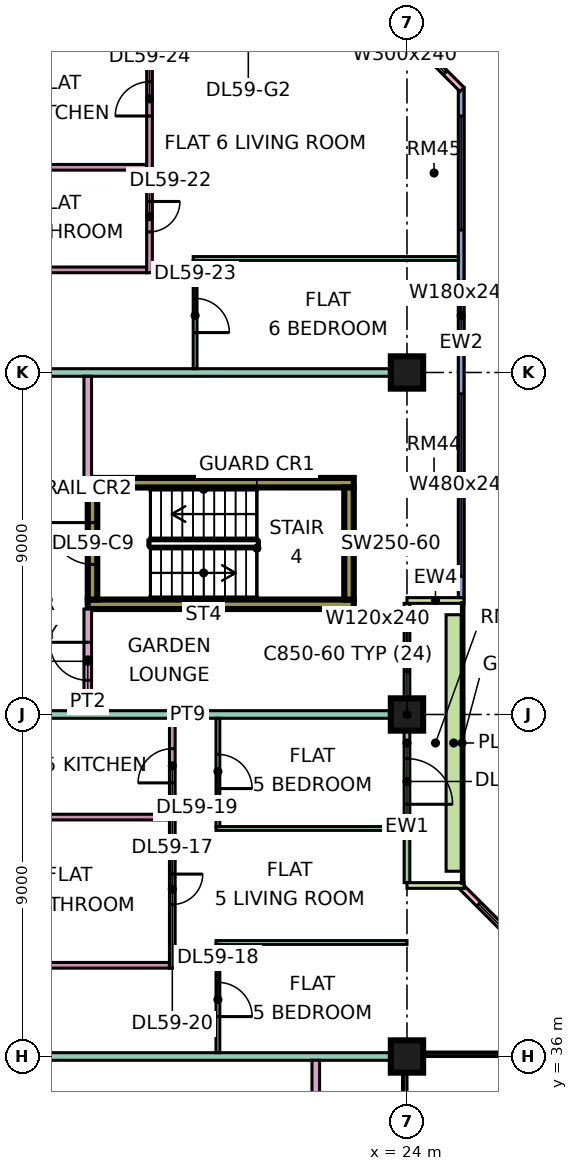
"""IFC4 building model, lengths in metres.
Left out: names, types, materials, properties, quantities, classifications, styles, units other than length and angle.
Written with IfcOpenShell. Run it as: python <this file> out.ifc"""

import sys

from ifc_helpers import new_model, si_unit, direction, frame, frame_2d, origin, origin_2d, place, context, subcontext, project, spatial, rectangle, extrude, element, fill, save


model = new_model("IFC4")
c1 = context("Model", 3, precision=1e-05, world=origin(), true_north=direction((0.0, 1.0)))
c2 = subcontext(c1, "Body", "Model", "MODEL_VIEW")
j1 = project(units=[si_unit("LENGTHUNIT", "METRE"), si_unit("PLANEANGLEUNIT", "RADIAN")], contexts=[c1])
p1 = place(None, origin())
s1 = spatial("IfcSite", under=j1, at=p1, CompositionType="ELEMENT")
p2 = place(p1, origin())
s2 = spatial("IfcBuilding", under=s1, at=p2, CompositionType="ELEMENT")
p3 = place(p2, frame((0.0, 0.0, 249.15)))
s3 = spatial("IfcBuildingStorey", under=s2, at=p3, CompositionType="ELEMENT", Elevation=249.15)
for number, where, z_axis, x_axis in (
    (1, (24.0, 36.0, 0.0), (0.0, 0.0, 1.0), (1.0, 0.0, 0.0)),
    (2, (24.0, 45.0, 0.0), (0.0, 0.0, 1.0), (1.0, 0.0, 0.0)),
    (3, (24.0, 54.0, 0.0), (0.0, 0.0, 1.0), (1.0, 0.0, 0.0)),
):
    element("IfcColumn", number, at=place(p3, frame(where, z_axis=z_axis, x_axis=x_axis)), inside=s3, PredefinedType="COLUMN", context=c2, shape_type="SweptSolid", body=[
        extrude(rectangle(XDim=0.85, YDim=0.85, at=origin_2d()), origin(), (0.0, 0.0, 1.0), 3.75),
    ])
for number, where, z_axis, x_axis in (
    (4, (15.6, 47.9, 0.0), (0.0, 0.0, 1.0), (1.0, 0.0, 0.0)),
    (5, (15.6, 51.1, 0.0), (0.0, 0.0, 1.0), (1.0, 0.0, 0.0)),
):
    element("IfcWall", number, at=place(p3, frame(where, z_axis=z_axis, x_axis=x_axis)), inside=s3, PredefinedType="SHEAR", context=c2, shape_type="SweptSolid", body=[
        extrude(rectangle(XDim=7.0, YDim=0.25, at=frame_2d((3.5, 0.0))), origin(), (0.0, 0.0, 1.0), 3.75),
    ])
p4 = place(p3, frame((15.725, 48.025, 0.0), z_axis=(0.0, 0.0, 1.0), x_axis=(0.0, 1.0, 0.0)))
e6 = element("IfcWall", 6, at=p4, inside=s3, PredefinedType="SHEAR", context=c2, shape_type="SweptSolid", body=[
    extrude(rectangle(XDim=2.95, YDim=0.25, at=frame_2d((1.475, 0.0))), origin(), (0.0, 0.0, 1.0), 3.75),
])
p5 = place(p4, frame((0.925, 0.0, 0.0)))
e7 = element("IfcOpeningElement", 7, at=p5, cuts=e6, PredefinedType="OPENING", context=c2, shape_type="SweptSolid", body=[
    extrude(rectangle(XDim=1.1, YDim=2.2, at=frame_2d((0.55, 1.1))), frame((0.0, 0.135, 0.0), z_axis=(0.0, -1.0, 0.0), x_axis=(1.0, 0.0, 0.0)), (0.0, 0.0, 1.0), 0.27),
])
p6 = place(p3, frame((22.475, 48.025, 0.0), z_axis=(0.0, 0.0, 1.0), x_axis=(0.0, 1.0, 0.0)))
e8 = element("IfcWall", 8, at=p6, inside=s3, PredefinedType="SHEAR", context=c2, shape_type="SweptSolid", body=[
    extrude(rectangle(XDim=2.95, YDim=0.25, at=frame_2d((1.475, 0.0))), origin(), (0.0, 0.0, 1.0), 3.75),
])
p7 = place(p3, frame((28.447, 37.447, 0.0), z_axis=(0.0, 0.0, 1.0), x_axis=(-0.707106781187, 0.707106781187, 0.0)))
e9 = element("IfcWall", 9, at=p7, inside=s3, PredefinedType="SOLIDWALL", context=c2, shape_type="SweptSolid", body=[
    extrude(rectangle(XDim=4.243, YDim=0.15, at=frame_2d((2.121, 0.0))), origin(), (0.0, 0.0, 1.0), 3.35),
])
p8 = place(p7, frame((0.621, 0.0, 0.45)))
e10 = element("IfcOpeningElement", 10, at=p8, cuts=e9, PredefinedType="OPENING", context=c2, shape_type="SweptSolid", body=[
    extrude(rectangle(XDim=3.0, YDim=2.4, at=frame_2d((1.5, 1.2))), frame((0.0, 0.085, 0.0), z_axis=(0.0, -1.0, 0.0), x_axis=(1.0, 0.0, 0.0)), (0.0, 0.0, 1.0), 0.17),
])
p9 = place(p3, frame((24.0, 40.575, 0.0), z_axis=(0.0, 0.0, 1.0), x_axis=(0.0, 1.0, 0.0)))
e11 = element("IfcWall", 11, at=p9, inside=s3, PredefinedType="SOLIDWALL", context=c2, shape_type="SweptSolid", body=[
    extrude(rectangle(XDim=7.35, YDim=0.15, at=frame_2d((3.675, 0.0))), origin(), (0.0, 0.0, 1.0), 3.35),
])
p10 = place(p9, frame((2.062, 0.0, 0.0)))
e12 = element("IfcOpeningElement", 12, at=p10, cuts=e11, PredefinedType="OPENING", context=c2, shape_type="SweptSolid", body=[
    extrude(rectangle(XDim=1.2, YDim=2.4, at=frame_2d((0.6, 1.2))), frame((0.0, 0.085, 0.0), z_axis=(0.0, -1.0, 0.0), x_axis=(1.0, 0.0, 0.0)), (0.0, 0.0, 1.0), 0.17),
])
p11 = place(p9, frame((5.55, 0.0, 0.45)))
e13 = element("IfcOpeningElement", 13, at=p11, cuts=e11, PredefinedType="OPENING", context=c2, shape_type="SweptSolid", body=[
    extrude(rectangle(XDim=1.2, YDim=2.4, at=frame_2d((0.6, 1.2))), frame((0.0, 0.085, 0.0), z_axis=(0.0, -1.0, 0.0), x_axis=(1.0, 0.0, 0.0)), (0.0, 0.0, 1.0), 0.17),
])
for number, where, z_axis, x_axis in (
    (14, (25.5, 40.5, 0.0), (0.0, 0.0, 1.0), (-1.0, 0.0, 0.0)),
    (15, (25.5, 48.0, 0.0), (0.0, 0.0, 1.0), (-1.0, 0.0, 0.0)),
):
    element("IfcWall", number, at=place(p3, frame(where, z_axis=z_axis, x_axis=x_axis)), inside=s3, PredefinedType="SOLIDWALL", context=c2, shape_type="SweptSolid", body=[
        extrude(rectangle(XDim=1.5, YDim=0.15, at=frame_2d((0.75, 0.0))), origin(), (0.0, 0.0, 1.0), 3.35),
    ])
p12 = place(p3, frame((25.425, 48.075, 0.0), z_axis=(0.0, 0.0, 1.0), x_axis=(0.0, 1.0, 0.0)))
e16 = element("IfcWall", 16, at=p12, inside=s3, PredefinedType="SOLIDWALL", context=c2, shape_type="SweptSolid", body=[
    extrude(rectangle(XDim=13.425, YDim=0.15, at=frame_2d((6.712, 0.0))), origin(), (0.0, 0.0, 1.0), 3.35),
])
p13 = place(p12, frame((0.562, 0.0, 0.45)))
e17 = element("IfcOpeningElement", 17, at=p13, cuts=e16, PredefinedType="OPENING", context=c2, shape_type="SweptSolid", body=[
    extrude(rectangle(XDim=4.8, YDim=2.4, at=frame_2d((2.4, 1.2))), frame((0.0, 0.085, 0.0), z_axis=(0.0, -1.0, 0.0), x_axis=(1.0, 0.0, 0.0)), (0.0, 0.0, 1.0), 0.17),
])
p14 = place(p12, frame((6.525, 0.0, 0.45)))
e18 = element("IfcOpeningElement", 18, at=p14, cuts=e16, PredefinedType="OPENING", context=c2, shape_type="SweptSolid", body=[
    extrude(rectangle(XDim=1.8, YDim=2.4, at=frame_2d((0.9, 1.2))), frame((0.0, 0.085, 0.0), z_axis=(0.0, -1.0, 0.0), x_axis=(1.0, 0.0, 0.0)), (0.0, 0.0, 1.0), 0.17),
])
p15 = place(p12, frame((9.675, 0.0, 0.45)))
e19 = element("IfcOpeningElement", 19, at=p15, cuts=e16, PredefinedType="OPENING", context=c2, shape_type="SweptSolid", body=[
    extrude(rectangle(XDim=3.0, YDim=2.4, at=frame_2d((1.5, 1.2))), frame((0.0, 0.085, 0.0), z_axis=(0.0, -1.0, 0.0), x_axis=(1.0, 0.0, 0.0)), (0.0, 0.0, 1.0), 0.17),
])
p16 = place(p3, frame((25.447, 61.447, 0.0), z_axis=(0.0, 0.0, 1.0), x_axis=(-0.707106781187, 0.707106781187, 0.0)))
e20 = element("IfcWall", 20, at=p16, inside=s3, PredefinedType="SOLIDWALL", context=c2, shape_type="SweptSolid", body=[
    extrude(rectangle(XDim=4.243, YDim=0.15, at=frame_2d((2.121, 0.0))), origin(), (0.0, 0.0, 1.0), 3.35),
])
p17 = place(p16, frame((0.621, 0.0, 0.45)))
e21 = element("IfcOpeningElement", 21, at=p17, cuts=e20, PredefinedType="OPENING", context=c2, shape_type="SweptSolid", body=[
    extrude(rectangle(XDim=3.0, YDim=2.4, at=frame_2d((1.5, 1.2))), frame((0.0, 0.085, 0.0), z_axis=(0.0, -1.0, 0.0), x_axis=(1.0, 0.0, 0.0)), (0.0, 0.0, 1.0), 0.17),
])
p18 = place(p3, frame((25.229, 40.875, 0.0), z_axis=(0.0, 0.0, 1.0), x_axis=(0.0, 1.0, 0.0)))
e22 = element("IfcWall", 22, at=p18, inside=s3, PredefinedType="SOLIDWALL", context=c2, shape_type="SweptSolid", body=[
    extrude(rectangle(XDim=6.75, YDim=0.4, at=frame_2d((3.375, 0.0))), origin(), (0.0, 0.0, 1.0), 0.7),
])
p19 = place(p3, frame((12.525, 36.0, 0.0), z_axis=(0.0, 0.0, 1.0), x_axis=(1.0, 0.0, 0.0)))
e23 = element("IfcWall", 23, at=p19, inside=s3, PredefinedType="PARTITIONING", context=c2, shape_type="SweptSolid", body=[
    extrude(rectangle(XDim=11.475, YDim=0.2, at=frame_2d((5.738, 0.0))), origin(), (0.0, 0.0, 1.0), 3.35),
])
for number, where, z_axis, x_axis in (
    (24, (12.525, 38.4, 0.0), (0.0, 0.0, 1.0), (1.0, 0.0, 0.0)),
    (25, (12.525, 42.3, 0.0), (0.0, 0.0, 1.0), (1.0, 0.0, 0.0)),
):
    element("IfcWall", number, at=place(p3, frame(where, z_axis=z_axis, x_axis=x_axis)), inside=s3, PredefinedType="PARTITIONING", context=c2, shape_type="SweptSolid", body=[
        extrude(rectangle(XDim=5.225, YDim=0.15, at=frame_2d((2.613, 0.0))), origin(), (0.0, 0.0, 1.0), 3.35),
    ])
p20 = place(p3, frame((12.525, 45.0, 0.0), z_axis=(0.0, 0.0, 1.0), x_axis=(1.0, 0.0, 0.0)))
e26 = element("IfcWall", 26, at=p20, inside=s3, PredefinedType="PARTITIONING", context=c2, shape_type="SweptSolid", body=[
    extrude(rectangle(XDim=11.401, YDim=0.2, at=frame_2d((5.701, 0.0))), origin(), (0.0, 0.0, 1.0), 3.35),
])
p21 = place(p3, frame((12.525, 54.0, 0.0), z_axis=(0.0, 0.0, 1.0), x_axis=(1.0, 0.0, 0.0)))
e27 = element("IfcWall", 27, at=p21, inside=s3, PredefinedType="PARTITIONING", context=c2, shape_type="SweptSolid", body=[
    extrude(rectangle(XDim=11.475, YDim=0.2, at=frame_2d((5.738, 0.0))), origin(), (0.0, 0.0, 1.0), 3.35),
])
for number, where, z_axis, x_axis in (
    (28, (12.525, 56.7, 0.0), (0.0, 0.0, 1.0), (1.0, 0.0, 0.0)),
    (29, (12.525, 59.4, 0.0), (0.0, 0.0, 1.0), (1.0, 0.0, 0.0)),
):
    element("IfcWall", number, at=place(p3, frame(where, z_axis=z_axis, x_axis=x_axis)), inside=s3, PredefinedType="PARTITIONING", context=c2, shape_type="SweptSolid", body=[
        extrude(rectangle(XDim=4.625, YDim=0.15, at=frame_2d((2.312, 0.0))), origin(), (0.0, 0.0, 1.0), 3.35),
    ])
p22 = place(p3, frame((15.6, 45.1, 0.0), z_axis=(0.0, 0.0, 1.0), x_axis=(0.0, 1.0, 0.0)))
e30 = element("IfcWall", 30, at=p22, inside=s3, PredefinedType="PARTITIONING", context=c2, shape_type="SweptSolid", body=[
    extrude(rectangle(XDim=2.675, YDim=0.2, at=frame_2d((1.337, 0.0))), origin(), (0.0, 0.0, 1.0), 3.35),
])
p23 = place(p22, frame((0.8, 0.0, 0.0)))
e31 = element("IfcOpeningElement", 31, at=p23, cuts=e30, PredefinedType="OPENING", context=c2, shape_type="SweptSolid", body=[
    extrude(rectangle(XDim=1.0, YDim=2.1, at=frame_2d((0.5, 1.05))), frame((0.0, 0.11, 0.0), z_axis=(0.0, -1.0, 0.0), x_axis=(1.0, 0.0, 0.0)), (0.0, 0.0, 1.0), 0.22),
])
p24 = place(p3, frame((15.6, 51.225, 0.0), z_axis=(0.0, 0.0, 1.0), x_axis=(0.0, 1.0, 0.0)))
e32 = element("IfcWall", 32, at=p24, inside=s3, PredefinedType="PARTITIONING", context=c2, shape_type="SweptSolid", body=[
    extrude(rectangle(XDim=2.675, YDim=0.2, at=frame_2d((1.337, 0.0))), origin(), (0.0, 0.0, 1.0), 3.35),
])
p25 = place(p3, frame((17.225, 56.625, 0.0), z_axis=(0.0, 0.0, 1.0), x_axis=(0.0, 1.0, 0.0)))
e33 = element("IfcWall", 33, at=p25, inside=s3, PredefinedType="PARTITIONING", context=c2, shape_type="SweptSolid", body=[
    extrude(rectangle(XDim=6.301, YDim=0.15, at=frame_2d((3.15, 0.0))), origin(), (0.0, 0.0, 1.0), 3.35),
])
p26 = place(p25, frame((1.075, 0.0, 0.0)))
e34 = element("IfcOpeningElement", 34, at=p26, cuts=e33, PredefinedType="OPENING", context=c2, shape_type="SweptSolid", body=[
    extrude(rectangle(XDim=0.8, YDim=2.1, at=frame_2d((0.4, 1.05))), frame((0.0, 0.085, 0.0), z_axis=(0.0, -1.0, 0.0), x_axis=(1.0, 0.0, 0.0)), (0.0, 0.0, 1.0), 0.17),
])
p27 = place(p25, frame((4.125, 0.0, 0.0)))
e35 = element("IfcOpeningElement", 35, at=p27, cuts=e33, PredefinedType="OPENING", context=c2, shape_type="SweptSolid", body=[
    extrude(rectangle(XDim=0.9, YDim=2.1, at=frame_2d((0.45, 1.05))), frame((0.0, 0.085, 0.0), z_axis=(0.0, -1.0, 0.0), x_axis=(1.0, 0.0, 0.0)), (0.0, 0.0, 1.0), 0.17),
])
p28 = place(p3, frame((17.825, 38.325, 0.0), z_axis=(0.0, 0.0, 1.0), x_axis=(0.0, 1.0, 0.0)))
e36 = element("IfcWall", 36, at=p28, inside=s3, PredefinedType="PARTITIONING", context=c2, shape_type="SweptSolid", body=[
    extrude(rectangle(XDim=6.575, YDim=0.15, at=frame_2d((3.288, 0.0))), origin(), (0.0, 0.0, 1.0), 3.35),
])
p29 = place(p28, frame((1.675, 0.0, 0.0)))
e37 = element("IfcOpeningElement", 37, at=p29, cuts=e36, PredefinedType="OPENING", context=c2, shape_type="SweptSolid", body=[
    extrude(rectangle(XDim=0.8, YDim=2.1, at=frame_2d((0.4, 1.05))), frame((0.0, 0.085, 0.0), z_axis=(0.0, -1.0, 0.0), x_axis=(1.0, 0.0, 0.0)), (0.0, 0.0, 1.0), 0.17),
])
p30 = place(p28, frame((4.875, 0.0, 0.0)))
e38 = element("IfcOpeningElement", 38, at=p30, cuts=e36, PredefinedType="OPENING", context=c2, shape_type="SweptSolid", body=[
    extrude(rectangle(XDim=0.9, YDim=2.1, at=frame_2d((0.45, 1.05))), frame((0.0, 0.085, 0.0), z_axis=(0.0, -1.0, 0.0), x_axis=(1.0, 0.0, 0.0)), (0.0, 0.0, 1.0), 0.17),
])
p31 = place(p3, frame((18.375, 57.0, 0.0), z_axis=(0.0, 0.0, 1.0), x_axis=(1.0, 0.0, 0.0)))
e39 = element("IfcWall", 39, at=p31, inside=s3, PredefinedType="PARTITIONING", context=c2, shape_type="SweptSolid", body=[
    extrude(rectangle(XDim=6.975, YDim=0.1, at=frame_2d((3.488, 0.0))), origin(), (0.0, 0.0, 1.0), 3.35),
])
p32 = place(p3, frame((18.425, 54.1, 0.0), z_axis=(0.0, 0.0, 1.0), x_axis=(0.0, 1.0, 0.0)))
e40 = element("IfcWall", 40, at=p32, inside=s3, PredefinedType="PARTITIONING", context=c2, shape_type="SweptSolid", body=[
    extrude(rectangle(XDim=2.85, YDim=0.1, at=frame_2d((1.425, 0.0))), origin(), (0.0, 0.0, 1.0), 3.35),
])
p33 = place(p32, frame((0.95, 0.0, 0.0)))
e41 = element("IfcOpeningElement", 41, at=p33, cuts=e40, PredefinedType="OPENING", context=c2, shape_type="SweptSolid", body=[
    extrude(rectangle(XDim=0.9, YDim=2.1, at=frame_2d((0.45, 1.05))), frame((0.0, 0.06, 0.0), z_axis=(0.0, -1.0, 0.0), x_axis=(1.0, 0.0, 0.0)), (0.0, 0.0, 1.0), 0.12),
])
p34 = place(p3, frame((18.975, 39.0, 0.0), z_axis=(0.0, 0.0, 1.0), x_axis=(1.0, 0.0, 0.0)))
e42 = element("IfcWall", 42, at=p34, inside=s3, PredefinedType="PARTITIONING", context=c2, shape_type="SweptSolid", body=[
    extrude(rectangle(XDim=5.025, YDim=0.1, at=frame_2d((2.512, 0.0))), origin(), (0.0, 0.0, 1.0), 3.35),
])
p35 = place(p3, frame((18.975, 42.0, 0.0), z_axis=(0.0, 0.0, 1.0), x_axis=(1.0, 0.0, 0.0)))
e43 = element("IfcWall", 43, at=p35, inside=s3, PredefinedType="PARTITIONING", context=c2, shape_type="SweptSolid", body=[
    extrude(rectangle(XDim=4.951, YDim=0.1, at=frame_2d((2.476, 0.0))), origin(), (0.0, 0.0, 1.0), 3.35),
])
p36 = place(p3, frame((19.025, 36.1, 0.0), z_axis=(0.0, 0.0, 1.0), x_axis=(0.0, 1.0, 0.0)))
e44 = element("IfcWall", 44, at=p36, inside=s3, PredefinedType="PARTITIONING", context=c2, shape_type="SweptSolid", body=[
    extrude(rectangle(XDim=2.85, YDim=0.1, at=frame_2d((1.425, 0.0))), origin(), (0.0, 0.0, 1.0), 3.35),
])
p37 = place(p36, frame((0.95, 0.0, 0.0)))
e45 = element("IfcOpeningElement", 45, at=p37, cuts=e44, PredefinedType="OPENING", context=c2, shape_type="SweptSolid", body=[
    extrude(rectangle(XDim=0.9, YDim=2.1, at=frame_2d((0.45, 1.05))), frame((0.0, 0.06, 0.0), z_axis=(0.0, -1.0, 0.0), x_axis=(1.0, 0.0, 0.0)), (0.0, 0.0, 1.0), 0.12),
])
p38 = place(p3, frame((19.025, 42.05, 0.0), z_axis=(0.0, 0.0, 1.0), x_axis=(0.0, 1.0, 0.0)))
e46 = element("IfcWall", 46, at=p38, inside=s3, PredefinedType="PARTITIONING", context=c2, shape_type="SweptSolid", body=[
    extrude(rectangle(XDim=2.85, YDim=0.1, at=frame_2d((1.425, 0.0))), origin(), (0.0, 0.0, 1.0), 3.35),
])
p39 = place(p38, frame((1.0, 0.0, 0.0)))
e47 = element("IfcOpeningElement", 47, at=p39, cuts=e46, PredefinedType="OPENING", context=c2, shape_type="SweptSolid", body=[
    extrude(rectangle(XDim=0.9, YDim=2.1, at=frame_2d((0.45, 1.05))), frame((0.0, 0.06, 0.0), z_axis=(0.0, -1.0, 0.0), x_axis=(1.0, 0.0, 0.0)), (0.0, 0.0, 1.0), 0.12),
])
p40 = place(p3, frame((21.6, 23.9, 0.0), z_axis=(0.0, 0.0, 1.0), x_axis=(0.0, 1.0, 0.0)))
e48 = element("IfcWall", 48, at=p40, inside=s3, PredefinedType="PARTITIONING", context=c2, shape_type="SweptSolid", body=[
    extrude(rectangle(XDim=12.0, YDim=0.2, at=frame_2d((6.0, 0.0))), origin(), (0.0, 0.0, 1.0), 3.35),
])
p41 = place(p8, origin())
e49 = element("IfcWindow", 49, at=p41, inside=s3, PartitioningType="SINGLE_PANEL", PredefinedType="WINDOW", context=c2, shape_type="SweptSolid", body=[
    extrude(rectangle(XDim=3.0, YDim=2.4, at=frame_2d((1.5, 1.2))), frame((0.0, 0.03, 0.0), z_axis=(0.0, -1.0, 0.0), x_axis=(1.0, 0.0, 0.0)), (0.0, 0.0, 1.0), 0.06),
])
fill(e10, e49)
p42 = place(p10, frame((1.2, 0.0, 0.0), z_axis=(0.0, 0.0, 1.0), x_axis=(-1.0, 0.0, 0.0)))
e50 = element("IfcDoor", 50, at=p42, inside=s3, OperationType="DOUBLE_DOOR_SINGLE_SWING", PredefinedType="DOOR", context=c2, shape_type="SweptSolid", body=[
    extrude(rectangle(XDim=1.2, YDim=2.4, at=frame_2d((0.6, 1.2))), frame((0.0, 0.025, 0.0), z_axis=(0.0, -1.0, 0.0), x_axis=(1.0, 0.0, 0.0)), (0.0, 0.0, 1.0), 0.05),
])
fill(e12, e50)
p43 = place(p11, origin())
e51 = element("IfcWindow", 51, at=p43, inside=s3, PartitioningType="SINGLE_PANEL", PredefinedType="WINDOW", context=c2, shape_type="SweptSolid", body=[
    extrude(rectangle(XDim=1.2, YDim=2.4, at=frame_2d((0.6, 1.2))), frame((0.0, 0.03, 0.0), z_axis=(0.0, -1.0, 0.0), x_axis=(1.0, 0.0, 0.0)), (0.0, 0.0, 1.0), 0.06),
])
fill(e13, e51)
p44 = place(p13, origin())
e52 = element("IfcWindow", 52, at=p44, inside=s3, PartitioningType="SINGLE_PANEL", PredefinedType="WINDOW", context=c2, shape_type="SweptSolid", body=[
    extrude(rectangle(XDim=4.8, YDim=2.4, at=frame_2d((2.4, 1.2))), frame((0.0, 0.03, 0.0), z_axis=(0.0, -1.0, 0.0), x_axis=(1.0, 0.0, 0.0)), (0.0, 0.0, 1.0), 0.06),
])
fill(e17, e52)
p45 = place(p14, origin())
e53 = element("IfcWindow", 53, at=p45, inside=s3, PartitioningType="SINGLE_PANEL", PredefinedType="WINDOW", context=c2, shape_type="SweptSolid", body=[
    extrude(rectangle(XDim=1.8, YDim=2.4, at=frame_2d((0.9, 1.2))), frame((0.0, 0.03, 0.0), z_axis=(0.0, -1.0, 0.0), x_axis=(1.0, 0.0, 0.0)), (0.0, 0.0, 1.0), 0.06),
])
fill(e18, e53)
p46 = place(p15, origin())
e54 = element("IfcWindow", 54, at=p46, inside=s3, PartitioningType="SINGLE_PANEL", PredefinedType="WINDOW", context=c2, shape_type="SweptSolid", body=[
    extrude(rectangle(XDim=3.0, YDim=2.4, at=frame_2d((1.5, 1.2))), frame((0.0, 0.03, 0.0), z_axis=(0.0, -1.0, 0.0), x_axis=(1.0, 0.0, 0.0)), (0.0, 0.0, 1.0), 0.06),
])
fill(e19, e54)
p47 = place(p17, origin())
e55 = element("IfcWindow", 55, at=p47, inside=s3, PartitioningType="SINGLE_PANEL", PredefinedType="WINDOW", context=c2, shape_type="SweptSolid", body=[
    extrude(rectangle(XDim=3.0, YDim=2.4, at=frame_2d((1.5, 1.2))), frame((0.0, 0.03, 0.0), z_axis=(0.0, -1.0, 0.0), x_axis=(1.0, 0.0, 0.0)), (0.0, 0.0, 1.0), 0.06),
])
fill(e21, e55)
p48 = place(p5, frame((1.1, 0.0, 0.0), z_axis=(0.0, 0.0, 1.0), x_axis=(-1.0, 0.0, 0.0)))
e56 = element("IfcDoor", 56, at=p48, inside=s3, OperationType="SINGLE_SWING_RIGHT", PredefinedType="DOOR", context=c2, shape_type="SweptSolid", body=[
    extrude(rectangle(XDim=1.1, YDim=2.2, at=frame_2d((0.55, 1.1))), frame((0.0, 0.025, 0.0), z_axis=(0.0, -1.0, 0.0), x_axis=(1.0, 0.0, 0.0)), (0.0, 0.0, 1.0), 0.05),
])
fill(e7, e56)
p49 = place(p29, origin())
e57 = element("IfcDoor", 57, at=p49, inside=s3, OperationType="SINGLE_SWING_RIGHT", PredefinedType="DOOR", context=c2, shape_type="SweptSolid", body=[
    extrude(rectangle(XDim=0.8, YDim=2.1, at=frame_2d((0.4, 1.05))), frame((0.0, 0.025, 0.0), z_axis=(0.0, -1.0, 0.0), x_axis=(1.0, 0.0, 0.0)), (0.0, 0.0, 1.0), 0.05),
])
fill(e37, e57)
p50 = place(p37, frame((0.9, 0.0, 0.0), z_axis=(0.0, 0.0, 1.0), x_axis=(-1.0, 0.0, 0.0)))
e58 = element("IfcDoor", 58, at=p50, inside=s3, OperationType="SINGLE_SWING_LEFT", PredefinedType="DOOR", context=c2, shape_type="SweptSolid", body=[
    extrude(rectangle(XDim=0.9, YDim=2.1, at=frame_2d((0.45, 1.05))), frame((0.0, 0.025, 0.0), z_axis=(0.0, -1.0, 0.0), x_axis=(1.0, 0.0, 0.0)), (0.0, 0.0, 1.0), 0.05),
])
fill(e45, e58)
p51 = place(p39, frame((0.9, 0.0, 0.0), z_axis=(0.0, 0.0, 1.0), x_axis=(-1.0, 0.0, 0.0)))
e59 = element("IfcDoor", 59, at=p51, inside=s3, OperationType="SINGLE_SWING_LEFT", PredefinedType="DOOR", context=c2, shape_type="SweptSolid", body=[
    extrude(rectangle(XDim=0.9, YDim=2.1, at=frame_2d((0.45, 1.05))), frame((0.0, 0.025, 0.0), z_axis=(0.0, -1.0, 0.0), x_axis=(1.0, 0.0, 0.0)), (0.0, 0.0, 1.0), 0.05),
])
fill(e47, e59)
p52 = place(p30, origin())
e60 = element("IfcDoor", 60, at=p52, inside=s3, OperationType="SINGLE_SWING_LEFT", PredefinedType="DOOR", context=c2, shape_type="SweptSolid", body=[
    extrude(rectangle(XDim=0.9, YDim=2.1, at=frame_2d((0.45, 1.05))), frame((0.0, 0.025, 0.0), z_axis=(0.0, -1.0, 0.0), x_axis=(1.0, 0.0, 0.0)), (0.0, 0.0, 1.0), 0.05),
])
fill(e38, e60)
p53 = place(p26, origin())
e61 = element("IfcDoor", 61, at=p53, inside=s3, OperationType="SINGLE_SWING_RIGHT", PredefinedType="DOOR", context=c2, shape_type="SweptSolid", body=[
    extrude(rectangle(XDim=0.8, YDim=2.1, at=frame_2d((0.4, 1.05))), frame((0.0, 0.025, 0.0), z_axis=(0.0, -1.0, 0.0), x_axis=(1.0, 0.0, 0.0)), (0.0, 0.0, 1.0), 0.05),
])
fill(e34, e61)
p54 = place(p33, frame((0.9, 0.0, 0.0), z_axis=(0.0, 0.0, 1.0), x_axis=(-1.0, 0.0, 0.0)))
e62 = element("IfcDoor", 62, at=p54, inside=s3, OperationType="SINGLE_SWING_LEFT", PredefinedType="DOOR", context=c2, shape_type="SweptSolid", body=[
    extrude(rectangle(XDim=0.9, YDim=2.1, at=frame_2d((0.45, 1.05))), frame((0.0, 0.025, 0.0), z_axis=(0.0, -1.0, 0.0), x_axis=(1.0, 0.0, 0.0)), (0.0, 0.0, 1.0), 0.05),
])
fill(e41, e62)
p55 = place(p27, origin())
e63 = element("IfcDoor", 63, at=p55, inside=s3, OperationType="SINGLE_SWING_LEFT", PredefinedType="DOOR", context=c2, shape_type="SweptSolid", body=[
    extrude(rectangle(XDim=0.9, YDim=2.1, at=frame_2d((0.45, 1.05))), frame((0.0, 0.025, 0.0), z_axis=(0.0, -1.0, 0.0), x_axis=(1.0, 0.0, 0.0)), (0.0, 0.0, 1.0), 0.05),
])
fill(e35, e63)
p56 = place(p23, frame((1.0, 0.0, 0.0), z_axis=(0.0, 0.0, 1.0), x_axis=(-1.0, 0.0, 0.0)))
e64 = element("IfcDoor", 64, at=p56, inside=s3, OperationType="SINGLE_SWING_RIGHT", PredefinedType="DOOR", context=c2, shape_type="SweptSolid", body=[
    extrude(rectangle(XDim=1.0, YDim=2.1, at=frame_2d((0.5, 1.05))), frame((0.0, 0.025, 0.0), z_axis=(0.0, -1.0, 0.0), x_axis=(1.0, 0.0, 0.0)), (0.0, 0.0, 1.0), 0.05),
])
fill(e31, e64)
save(model, sys.argv[1])
